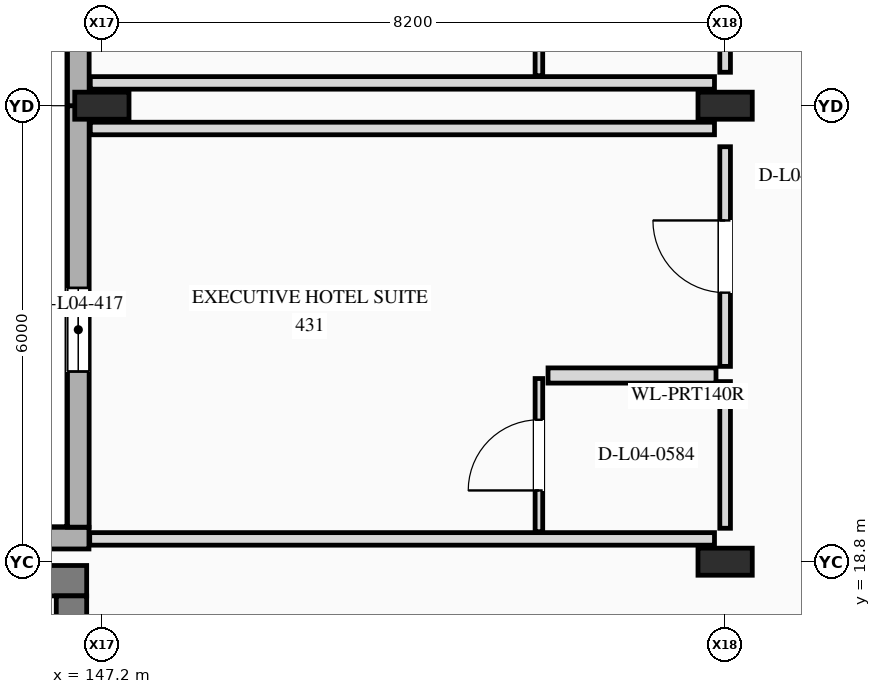
"""IFC4 building model, lengths in metres.
Left out: names, types, materials, properties, quantities, classifications, styles, units other than length and angle.
Written with IfcOpenShell. Run it as: python <this file> out.ifc"""

import sys

from ifc_helpers import new_model, si_unit, direction, frame, frame_2d, origin, origin_2d, place, context, subcontext, project, spatial, rectangle, i_section, extrude, element, fill, save


model = new_model("IFC4")
c1 = context("Model", 3, precision=1e-05, world=origin(), true_north=direction((0.0, 1.0)))
c2 = subcontext(c1, "Body", "Model", "MODEL_VIEW")
j1 = project(units=[si_unit("LENGTHUNIT", "METRE"), si_unit("PLANEANGLEUNIT", "RADIAN")], contexts=[c1])
p1 = place(None, origin())
s1 = spatial("IfcSite", under=j1, at=p1, CompositionType="ELEMENT")
p2 = place(p1, origin())
s2 = spatial("IfcBuilding", under=s1, at=p2, CompositionType="ELEMENT")
p3 = place(p2, frame((0.0, 0.0, 19.5)))
s3 = spatial("IfcBuildingStorey", under=s2, at=p3, CompositionType="ELEMENT", Elevation=19.5)
for number, where, z_axis, x_axis in (
    (1, (147.2, 24.8, 0.0), (0.0, 0.0, 1.0), (0.0, 1.0, 0.0)),
    (2, (155.4, 18.8, 0.0), (0.0, 0.0, 1.0), (0.0, 1.0, 0.0)),
    (3, (155.4, 24.8, 0.0), (0.0, 0.0, 1.0), (0.0, 1.0, 0.0)),
):
    element("IfcColumn", number, at=place(p3, frame(where, z_axis=z_axis, x_axis=x_axis)), inside=s3, PredefinedType="COLUMN", context=c2, shape_type="SweptSolid", body=[
        extrude(i_section(OverallWidth=0.356, OverallDepth=0.714, WebThickness=0.019, FlangeThickness=0.034, at=origin_2d()), origin(), (0.0, 0.0, 1.0), 3.9),
    ])
p4 = place(p3, frame((147.03, 19.11, 0.0), z_axis=(0.0, 0.0, 1.0), x_axis=(-1.0, 0.0, 0.0)))
e4 = element("IfcWall", 4, at=p4, inside=s3, PredefinedType="STANDARD", context=c2, shape_type="SweptSolid", body=[
    extrude(rectangle(XDim=11.03, YDim=0.285, at=frame_2d((5.515, 0.0))), origin(), (0.0, 0.0, 1.0), 3.9),
])
p5 = place(p3, frame((146.89, 19.254, 0.0), z_axis=(0.0, 0.0, 1.0), x_axis=(0.0, 1.0, 0.0)))
e5 = element("IfcWall", 5, at=p5, inside=s3, PredefinedType="STANDARD", context=c2, shape_type="SweptSolid", body=[
    extrude(rectangle(XDim=5.546, YDim=0.285, at=frame_2d((2.773, 0.0))), origin(), (0.0, 0.0, 1.0), 3.9),
])
p6 = place(p5, frame((2.048, 0.0, 0.85)))
e6 = element("IfcOpeningElement", 6, at=p6, cuts=e5, PredefinedType="OPENING", context=c2, shape_type="SweptSolid", body=[
    extrude(rectangle(XDim=1.1, YDim=1.5, at=frame_2d((0.55, 0.75))), frame((0.0, 0.152, 0.0), z_axis=(0.0, -1.0, 0.0), x_axis=(1.0, 0.0, 0.0)), (0.0, 0.0, 1.0), 0.305),
])
p7 = place(p3, frame((146.89, 24.8, 0.0), z_axis=(0.0, 0.0, 1.0), x_axis=(0.0, 1.0, 0.0)))
e7 = element("IfcWall", 7, at=p7, inside=s3, PredefinedType="STANDARD", context=c2, shape_type="SweptSolid", body=[
    extrude(rectangle(XDim=8.4, YDim=0.285, at=frame_2d((4.2, 0.0))), origin(), (0.0, 0.0, 1.0), 3.9),
])
p8 = place(p7, frame((3.3, 0.0, 0.85)))
e8 = element("IfcOpeningElement", 8, at=p8, cuts=e7, PredefinedType="OPENING", context=c2, shape_type="SweptSolid", body=[
    extrude(rectangle(XDim=1.8, YDim=1.8, at=frame_2d((0.9, 0.9))), frame((0.0, 0.152, 0.0), z_axis=(0.0, -1.0, 0.0), x_axis=(1.0, 0.0, 0.0)), (0.0, 0.0, 1.0), 0.305),
])
p9 = place(p3, frame((147.0, 18.55, 0.0), z_axis=(0.0, 0.0, 1.0), x_axis=(-1.0, 0.0, 0.0)))
e9 = element("IfcWall", 9, at=p9, inside=s3, PredefinedType="SHEAR", context=c2, shape_type="SweptSolid", body=[
    extrude(rectangle(XDim=10.6, YDim=0.4, at=frame_2d((5.3, 0.0))), origin(), (0.0, 0.0, 1.0), 3.9),
])
p10 = place(p3, frame((146.8, 11.0, 0.0), z_axis=(0.0, 0.0, 1.0), x_axis=(0.0, 1.0, 0.0)))
e10 = element("IfcWall", 10, at=p10, inside=s3, PredefinedType="SHEAR", context=c2, shape_type="SweptSolid", body=[
    extrude(rectangle(XDim=7.35, YDim=0.4, at=frame_2d((3.675, 0.0))), origin(), (0.0, 0.0, 1.0), 3.9),
])
p11 = place(p10, frame((5.0, 0.0, 0.0)))
e11 = element("IfcOpeningElement", 11, at=p11, cuts=e10, PredefinedType="OPENING", context=c2, shape_type="SweptSolid", body=[
    extrude(rectangle(XDim=0.95, YDim=2.2, at=frame_2d((0.475, 1.1))), frame((0.0, 0.21, 0.0), z_axis=(0.0, -1.0, 0.0), x_axis=(1.0, 0.0, 0.0)), (0.0, 0.0, 1.0), 0.42),
])
p12 = place(p10, frame((0.175, 0.0, 0.0)))
e12 = element("IfcOpeningElement", 12, at=p12, cuts=e10, PredefinedType="OPENING", context=c2, shape_type="SweptSolid", body=[
    extrude(rectangle(XDim=1.15, YDim=2.25, at=frame_2d((0.575, 1.125))), frame((0.0, 0.21, 0.0), z_axis=(0.0, -1.0, 0.0), x_axis=(1.0, 0.0, 0.0)), (0.0, 0.0, 1.0), 0.42),
])
p13 = place(p10, frame((1.875, 0.0, 0.0)))
e13 = element("IfcOpeningElement", 13, at=p13, cuts=e10, PredefinedType="OPENING", context=c2, shape_type="SweptSolid", body=[
    extrude(rectangle(XDim=1.15, YDim=2.25, at=frame_2d((0.575, 1.125))), frame((0.0, 0.21, 0.0), z_axis=(0.0, -1.0, 0.0), x_axis=(1.0, 0.0, 0.0)), (0.0, 0.0, 1.0), 0.42),
])
p14 = place(p3, frame((155.4, 19.24, 0.0), z_axis=(0.0, 0.0, 1.0), x_axis=(0.0, 1.0, 0.0)))
e14 = element("IfcWall", 14, at=p14, inside=s3, PredefinedType="PARTITIONING", context=c2, shape_type="SweptSolid", body=[
    extrude(rectangle(XDim=1.93, YDim=0.14, at=frame_2d((0.965, 0.0))), origin(), (0.0, 0.0, 1.0), 3.059),
])
p15 = place(p3, frame((155.4, 21.37, 0.0), z_axis=(0.0, 0.0, 1.0), x_axis=(0.0, 1.0, 0.0)))
e15 = element("IfcWall", 15, at=p15, inside=s3, PredefinedType="PARTITIONING", context=c2, shape_type="SweptSolid", body=[
    extrude(rectangle(XDim=2.89, YDim=0.14, at=frame_2d((1.445, 0.0))), origin(), (0.0, 0.0, 1.0), 3.059),
])
p16 = place(p15, frame((0.97, 0.0, 0.0)))
e16 = element("IfcOpeningElement", 16, at=p16, cuts=e15, PredefinedType="OPENING", context=c2, shape_type="SweptSolid", body=[
    extrude(rectangle(XDim=0.95, YDim=2.15, at=frame_2d((0.475, 1.075))), frame((0.0, 0.08, 0.0), z_axis=(0.0, -1.0, 0.0), x_axis=(1.0, 0.0, 0.0)), (0.0, 0.0, 1.0), 0.16),
])
p17 = place(p3, frame((147.04, 19.1, 0.0), z_axis=(0.0, 0.0, 1.0), x_axis=(1.0, 0.0, 0.0)))
e17 = element("IfcWall", 17, at=p17, inside=s3, PredefinedType="PARTITIONING", context=c2, shape_type="SweptSolid", body=[
    extrude(rectangle(XDim=8.22, YDim=0.165, at=frame_2d((4.11, 0.0))), origin(), (0.0, 0.0, 1.0), 3.585),
])
p18 = place(p3, frame((147.048, 24.5, 0.0), z_axis=(0.0, 0.0, 1.0), x_axis=(1.0, 0.0, 0.0)))
e18 = element("IfcWall", 18, at=p18, inside=s3, PredefinedType="PARTITIONING", context=c2, shape_type="SweptSolid", body=[
    extrude(rectangle(XDim=8.212, YDim=0.165, at=frame_2d((4.106, 0.0))), origin(), (0.0, 0.0, 1.0), 2.998),
])
p19 = place(p3, frame((153.07, 21.25, 0.0), z_axis=(0.0, 0.0, 1.0), x_axis=(1.0, 0.0, 0.0)))
e19 = element("IfcWall", 19, at=p19, inside=s3, PredefinedType="PLUMBINGWALL", context=c2, shape_type="SweptSolid", body=[
    extrude(rectangle(XDim=2.21, YDim=0.2, at=frame_2d((1.105, 0.0))), origin(), (0.0, 0.0, 1.0), 3.585),
])
p20 = place(p3, frame((152.95, 19.195, 0.0), z_axis=(0.0, 0.0, 1.0), x_axis=(0.0, 1.0, 0.0)))
e20 = element("IfcWall", 20, at=p20, inside=s3, PredefinedType="PARTITIONING", context=c2, shape_type="SweptSolid", body=[
    extrude(rectangle(XDim=2.015, YDim=0.1, at=frame_2d((1.008, 0.0))), origin(), (0.0, 0.0, 1.0), 3.585),
])
p21 = place(p20, frame((0.543, 0.0, 0.0)))
e21 = element("IfcOpeningElement", 21, at=p21, cuts=e20, PredefinedType="OPENING", context=c2, shape_type="SweptSolid", body=[
    extrude(rectangle(XDim=0.93, YDim=2.14, at=frame_2d((0.465, 1.07))), frame((0.0, 0.06, 0.0), z_axis=(0.0, -1.0, 0.0), x_axis=(1.0, 0.0, 0.0)), (0.0, 0.0, 1.0), 0.12),
])
p22 = place(p3, frame((155.4, 25.24, 0.0), z_axis=(0.0, 0.0, 1.0), x_axis=(0.0, 1.0, 0.0)))
e22 = element("IfcWall", 22, at=p22, inside=s3, PredefinedType="PARTITIONING", context=c2, shape_type="SweptSolid", body=[
    extrude(rectangle(XDim=1.93, YDim=0.14, at=frame_2d((0.965, 0.0))), origin(), (0.0, 0.0, 1.0), 3.059),
])
p23 = place(p3, frame((147.048, 25.1, 0.0), z_axis=(0.0, 0.0, 1.0), x_axis=(1.0, 0.0, 0.0)))
e23 = element("IfcWall", 23, at=p23, inside=s3, PredefinedType="PARTITIONING", context=c2, shape_type="SweptSolid", body=[
    extrude(rectangle(XDim=8.212, YDim=0.165, at=frame_2d((4.106, 0.0))), origin(), (0.0, 0.0, 1.0), 2.998),
])
p24 = place(p3, frame((152.95, 25.195, 0.0), z_axis=(0.0, 0.0, 1.0), x_axis=(0.0, 1.0, 0.0)))
e24 = element("IfcWall", 24, at=p24, inside=s3, PredefinedType="PARTITIONING", context=c2, shape_type="SweptSolid", body=[
    extrude(rectangle(XDim=2.015, YDim=0.1, at=frame_2d((1.008, 0.0))), origin(), (0.0, 0.0, 1.0), 3.193),
])
p25 = place(p24, frame((0.568, 0.0, 0.0)))
e25 = element("IfcOpeningElement", 25, at=p25, cuts=e24, PredefinedType="OPENING", context=c2, shape_type="SweptSolid", body=[
    extrude(rectangle(XDim=0.88, YDim=2.18, at=frame_2d((0.44, 1.09))), frame((0.0, 0.06, 0.0), z_axis=(0.0, -1.0, 0.0), x_axis=(1.0, 0.0, 0.0)), (0.0, 0.0, 1.0), 0.12),
])
p26 = place(p6, origin())
e26 = element("IfcWindow", 26, at=p26, inside=s3, PartitioningType="SINGLE_PANEL", PredefinedType="WINDOW", context=c2, shape_type="SweptSolid", body=[
    extrude(rectangle(XDim=1.1, YDim=1.5, at=frame_2d((0.55, 0.75))), frame((0.0, 0.03, 0.0), z_axis=(0.0, -1.0, 0.0), x_axis=(1.0, 0.0, 0.0)), (0.0, 0.0, 1.0), 0.06),
])
fill(e6, e26)
p27 = place(p16, origin())
e27 = element("IfcDoor", 27, at=p27, inside=s3, OperationType="SINGLE_SWING_RIGHT", PredefinedType="DOOR", context=c2, shape_type="SweptSolid", body=[
    extrude(rectangle(XDim=0.95, YDim=2.15, at=frame_2d((0.475, 1.075))), frame((0.0, 0.025, 0.0), z_axis=(0.0, -1.0, 0.0), x_axis=(1.0, 0.0, 0.0)), (0.0, 0.0, 1.0), 0.05),
])
fill(e16, e27)
p28 = place(p21, origin())
e28 = element("IfcDoor", 28, at=p28, inside=s3, OperationType="SINGLE_SWING_LEFT", PredefinedType="DOOR", context=c2, shape_type="SweptSolid", body=[
    extrude(rectangle(XDim=0.93, YDim=2.14, at=frame_2d((0.465, 1.07))), frame((0.0, 0.025, 0.0), z_axis=(0.0, -1.0, 0.0), x_axis=(1.0, 0.0, 0.0)), (0.0, 0.0, 1.0), 0.05),
])
fill(e21, e28)
save(model, sys.argv[1])
